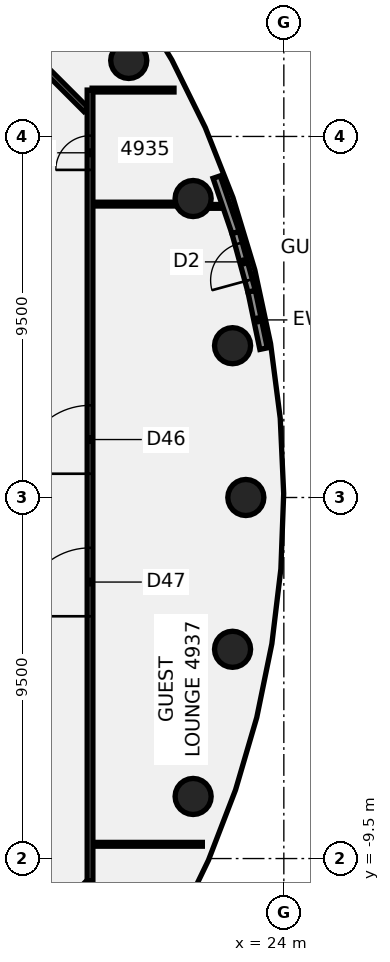
"""IFC4 building model, lengths in metres.
Left out: names, types, materials, properties, quantities, classifications, styles, units other than length and angle.
Written with IfcOpenShell. Run it as: python <this file> out.ifc"""

import sys

from ifc_helpers import new_model, si_unit, direction, frame, frame_2d, origin, origin_2d, place, context, subcontext, project, spatial, rectangle, circle, extrude, element, fill, save


model = new_model("IFC4")
c1 = context("Model", 3, precision=1e-05, world=origin(), true_north=direction((0.0, 1.0)))
c2 = subcontext(c1, "Body", "Model", "MODEL_VIEW")
j1 = project(units=[si_unit("LENGTHUNIT", "METRE"), si_unit("PLANEANGLEUNIT", "RADIAN")], contexts=[c1])
p1 = place(None, origin())
s1 = spatial("IfcSite", under=j1, at=p1, CompositionType="ELEMENT")
p2 = place(p1, origin())
s2 = spatial("IfcBuilding", under=s1, at=p2, CompositionType="ELEMENT")
p3 = place(p2, frame((0.0, 0.0, 196.9)))
s3 = spatial("IfcBuildingStorey", under=s2, at=p3, CompositionType="ELEMENT", Elevation=196.9)
for number, where, z_axis, x_axis in (
    (1, (23.0, 0.0, -0.14), (0.0, 0.0, 1.0), (1.0, 0.0, 0.0)),
    (2, (22.651, 3.994, -0.14), (0.0, 0.0, 1.0), (1.0, 0.0, 0.0)),
    (3, (21.613, 7.866, -0.14), (0.0, 0.0, 1.0), (1.0, 0.0, 0.0)),
    (4, (19.919, 11.5, -0.14), (0.0, 0.0, 1.0), (1.0, 0.0, 0.0)),
    (5, (21.613, -7.866, -0.14), (0.0, 0.0, 1.0), (1.0, 0.0, 0.0)),
    (6, (22.651, -3.994, -0.14), (0.0, 0.0, 1.0), (1.0, 0.0, 0.0)),
):
    element("IfcColumn", number, at=place(p3, frame(where, z_axis=z_axis, x_axis=x_axis)), inside=s3, PredefinedType="COLUMN", context=c2, shape_type="SweptSolid", body=[
        extrude(circle(Radius=0.475, at=origin_2d()), origin(), (0.0, 0.0, 1.0), 3.6),
    ])
p4 = place(p3, frame((17.128, 11.872, 0.0), z_axis=(0.0, 0.0, 1.0), x_axis=(0.707106781187, -0.707106781187, 0.0)))
e7 = element("IfcWall", 7, at=p4, inside=s3, PredefinedType="PARTITIONING", context=c2, shape_type="SweptSolid", body=[
    extrude(rectangle(XDim=2.35, YDim=0.15, at=frame_2d((1.175, 0.0))), origin(), (0.0, 0.0, 1.0), 2.864),
])
p5 = place(p3, frame((18.955, -9.125, 0.0), z_axis=(0.0, 0.0, 1.0), x_axis=(1.0, 0.0, 0.0)))
e8 = element("IfcWall", 8, at=p5, inside=s3, PredefinedType="PARTITIONING", context=c2, shape_type="SweptSolid", body=[
    extrude(rectangle(XDim=2.9, YDim=0.1, at=frame_2d((1.45, 0.0))), origin(), (0.0, 0.0, 1.0), 2.864),
])
p6 = place(p3, frame((18.955, 7.72, 0.0), z_axis=(0.0, 0.0, 1.0), x_axis=(1.0, 0.0, 0.0)))
e9 = element("IfcWall", 9, at=p6, inside=s3, PredefinedType="PARTITIONING", context=c2, shape_type="SweptSolid", body=[
    extrude(rectangle(XDim=2.212, YDim=0.1, at=frame_2d((1.106, 0.0))), origin(), (0.0, 0.0, 1.0), 2.864),
])
p7 = place(p3, frame((22.059, 7.66, 0.0), z_axis=(0.0, 0.0, 1.0), x_axis=(1.0, 0.0, 0.0)))
e10 = element("IfcWall", 10, at=p7, inside=s3, PredefinedType="PARTITIONING", context=c2, shape_type="SweptSolid", body=[
    extrude(rectangle(XDim=0.34, YDim=0.1, at=frame_2d((0.17, 0.0))), origin(), (0.0, 0.0, 1.0), 2.864),
])
p8 = place(p3, frame((18.955, 10.72, 0.0), z_axis=(0.0, 0.0, 1.0), x_axis=(1.0, 0.0, 0.0)))
e11 = element("IfcWall", 11, at=p8, inside=s3, PredefinedType="PARTITIONING", context=c2, shape_type="SweptSolid", body=[
    extrude(rectangle(XDim=2.155, YDim=0.1, at=frame_2d((1.078, 0.0))), origin(), (0.0, 0.0, 1.0), 2.864),
])
p9 = place(p3, frame((17.1, -11.9, 0.0), z_axis=(0.0, 0.0, 1.0), x_axis=(0.707106781187, 0.707106781187, 0.0)))
e12 = element("IfcWall", 12, at=p9, inside=s3, PredefinedType="PARTITIONING", context=c2, shape_type="SweptSolid", body=[
    extrude(rectangle(XDim=2.505, YDim=0.15, at=frame_2d((1.253, 0.0))), origin(), (0.0, 0.0, 1.0), 2.864),
])
p10 = place(p3, frame((18.9, -10.1, 0.0), z_axis=(0.0, 0.0, 1.0), x_axis=(0.0, 1.0, 0.0)))
e13 = element("IfcWall", 13, at=p10, inside=s3, PredefinedType="PARTITIONING", context=c2, shape_type="SweptSolid", body=[
    extrude(rectangle(XDim=20.82, YDim=0.15, at=frame_2d((10.41, 0.0))), origin(), (0.0, 0.0, 1.0), 2.864),
])
p11 = place(p10, frame((18.72, 0.0, 0.0)))
e14 = element("IfcOpeningElement", 14, at=p11, cuts=e13, PredefinedType="OPENING", context=c2, shape_type="SweptSolid", body=[
    extrude(rectangle(XDim=0.9, YDim=2.1, at=frame_2d((0.45, 1.05))), frame((0.0, 0.085, 0.0), z_axis=(0.0, -1.0, 0.0), x_axis=(1.0, 0.0, 0.0)), (0.0, 0.0, 1.0), 0.17),
])
p12 = place(p10, frame((10.725, 0.0, 0.0)))
e15 = element("IfcOpeningElement", 15, at=p12, cuts=e13, PredefinedType="OPENING", context=c2, shape_type="SweptSolid", body=[
    extrude(rectangle(XDim=1.8, YDim=2.1, at=frame_2d((0.9, 1.05))), frame((0.0, 0.085, 0.0), z_axis=(0.0, -1.0, 0.0), x_axis=(1.0, 0.0, 0.0)), (0.0, 0.0, 1.0), 0.17),
])
p13 = place(p10, frame((6.975, 0.0, 0.0)))
e16 = element("IfcOpeningElement", 16, at=p13, cuts=e13, PredefinedType="OPENING", context=c2, shape_type="SweptSolid", body=[
    extrude(rectangle(XDim=1.8, YDim=2.1, at=frame_2d((0.9, 1.05))), frame((0.0, 0.085, 0.0), z_axis=(0.0, -1.0, 0.0), x_axis=(1.0, 0.0, 0.0)), (0.0, 0.0, 1.0), 0.17),
])
p14 = place(p3, frame((23.467, 3.917, 0.0), z_axis=(0.0, 0.0, 1.0), x_axis=(-0.204105774146, 0.978948840829, 0.0)))
e17 = element("IfcWall", 17, at=p14, inside=s3, PredefinedType="SOLIDWALL", context=c2, shape_type="SweptSolid", body=[
    extrude(rectangle(XDim=1.544, YDim=0.2, at=frame_2d((0.772, 0.0))), origin(), (0.0, 0.0, 1.0), 3.46),
])
p15 = place(p3, frame((22.731, 6.971, 0.0), z_axis=(0.0, 0.0, 1.0), x_axis=(-0.322722243026, 0.946493715698, 0.0)))
e18 = element("IfcWall", 18, at=p15, inside=s3, PredefinedType="SOLIDWALL", context=c2, shape_type="SweptSolid", body=[
    extrude(rectangle(XDim=1.543, YDim=0.2, at=frame_2d((0.771, 0.0))), origin(), (0.0, 0.0, 1.0), 3.46),
])
p16 = place(p3, frame((23.152, 5.428, 0.0), z_axis=(0.0, 0.0, 1.0), x_axis=(-0.26356961997, 0.964640376217, 0.0)))
e19 = element("IfcWall", 19, at=p16, inside=s3, PredefinedType="SOLIDWALL", context=c2, shape_type="SweptSolid", body=[
    extrude(rectangle(XDim=1.599, YDim=0.2, at=frame_2d((0.799, 0.0))), origin(), (0.0, 0.0, 1.0), 3.46),
])
p17 = place(p16, frame((0.299, 0.0, 0.0)))
e20 = element("IfcOpeningElement", 20, at=p17, cuts=e19, PredefinedType="OPENING", context=c2, shape_type="SweptSolid", body=[
    extrude(rectangle(XDim=1.0, YDim=2.4, at=frame_2d((0.5, 1.2))), frame((0.0, 0.11, 0.0), z_axis=(0.0, -1.0, 0.0), x_axis=(1.0, 0.0, 0.0)), (0.0, 0.0, 1.0), 0.22),
])
p18 = place(p11, frame((0.9, 0.0, 0.0), z_axis=(0.0, 0.0, 1.0), x_axis=(-1.0, 0.0, 0.0)))
e21 = element("IfcDoor", 21, at=p18, inside=s3, OperationType="SINGLE_SWING_RIGHT", PredefinedType="DOOR", context=c2, shape_type="SweptSolid", body=[
    extrude(rectangle(XDim=0.9, YDim=2.1, at=frame_2d((0.45, 1.05))), frame((0.0, 0.025, 0.0), z_axis=(0.0, -1.0, 0.0), x_axis=(1.0, 0.0, 0.0)), (0.0, 0.0, 1.0), 0.05),
])
fill(e14, e21)
p19 = place(p12, frame((1.8, 0.0, 0.0), z_axis=(0.0, 0.0, 1.0), x_axis=(-1.0, 0.0, 0.0)))
e22 = element("IfcDoor", 22, at=p19, inside=s3, OperationType="DOUBLE_DOOR_SINGLE_SWING", PredefinedType="DOOR", context=c2, shape_type="SweptSolid", body=[
    extrude(rectangle(XDim=1.8, YDim=2.1, at=frame_2d((0.9, 1.05))), frame((0.0, 0.025, 0.0), z_axis=(0.0, -1.0, 0.0), x_axis=(1.0, 0.0, 0.0)), (0.0, 0.0, 1.0), 0.05),
])
fill(e15, e22)
p20 = place(p13, frame((1.8, 0.0, 0.0), z_axis=(0.0, 0.0, 1.0), x_axis=(-1.0, 0.0, 0.0)))
e23 = element("IfcDoor", 23, at=p20, inside=s3, OperationType="DOUBLE_DOOR_SINGLE_SWING", PredefinedType="DOOR", context=c2, shape_type="SweptSolid", body=[
    extrude(rectangle(XDim=1.8, YDim=2.1, at=frame_2d((0.9, 1.05))), frame((0.0, 0.025, 0.0), z_axis=(0.0, -1.0, 0.0), x_axis=(1.0, 0.0, 0.0)), (0.0, 0.0, 1.0), 0.05),
])
fill(e16, e23)
p21 = place(p17, origin())
e24 = element("IfcDoor", 24, at=p21, inside=s3, OperationType="SINGLE_SWING_LEFT", PredefinedType="DOOR", context=c2, shape_type="SweptSolid", body=[
    extrude(rectangle(XDim=1.0, YDim=2.4, at=frame_2d((0.5, 1.2))), frame((0.0, 0.025, 0.0), z_axis=(0.0, -1.0, 0.0), x_axis=(1.0, 0.0, 0.0)), (0.0, 0.0, 1.0), 0.05),
])
fill(e20, e24)
save(model, sys.argv[1])
